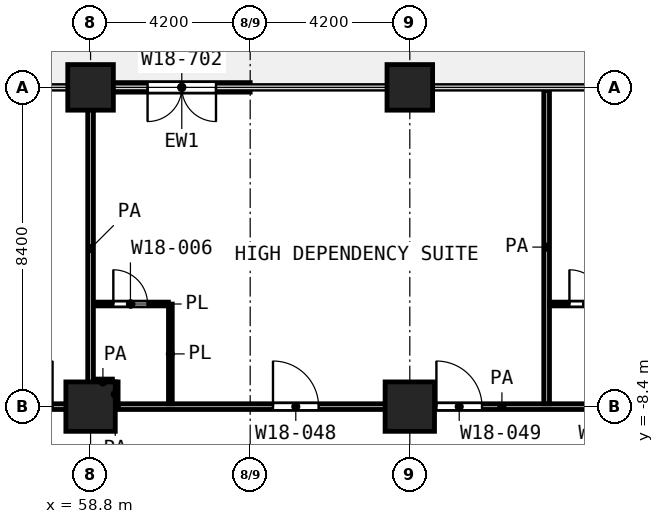
"""IFC4 building model, lengths in metres.
Left out: names, types, materials, properties, quantities, classifications, styles, units other than length and angle.
Written with IfcOpenShell. Run it as: python <this file> out.ifc"""

import sys

from ifc_helpers import new_model, si_unit, direction, frame, frame_2d, origin, origin_2d, place, context, subcontext, project, spatial, rectangle, extrude, element, fill, save


model = new_model("IFC4")
c1 = context("Model", 3, precision=1e-05, world=origin(), true_north=direction((0.0, 1.0)))
c2 = subcontext(c1, "Body", "Model", "MODEL_VIEW")
j1 = project(units=[si_unit("LENGTHUNIT", "METRE"), si_unit("PLANEANGLEUNIT", "RADIAN")], contexts=[c1])
p1 = place(None, origin())
s1 = spatial("IfcSite", under=j1, at=p1, CompositionType="ELEMENT")
p2 = place(p1, origin())
s2 = spatial("IfcBuilding", under=s1, at=p2, CompositionType="ELEMENT")
p3 = place(p2, frame((0.0, 0.0, 81.2)))
s3 = spatial("IfcBuildingStorey", under=s2, at=p3, CompositionType="ELEMENT", Elevation=81.2)
for number, where, z_axis, x_axis in (
    (1, (58.8, 0.0, 0.0), (0.0, 0.0, 1.0), (1.0, 0.0, 0.0)),
    (2, (67.2, 0.0, 0.0), (0.0, 0.0, 1.0), (1.0, 0.0, 0.0)),
):
    element("IfcColumn", number, at=place(p3, frame(where, z_axis=z_axis, x_axis=x_axis)), inside=s3, PredefinedType="COLUMN", context=c2, shape_type="SweptSolid", body=[
        extrude(rectangle(XDim=1.2, YDim=1.2, at=origin_2d()), origin(), (0.0, 0.0, 1.0), 4.2),
    ])
for number, where, z_axis, x_axis in (
    (3, (58.8, -8.4, 0.0), (0.0, 0.0, 1.0), (1.0, 0.0, 0.0)),
    (4, (67.2, -8.4, 0.0), (0.0, 0.0, 1.0), (1.0, 0.0, 0.0)),
):
    element("IfcColumn", number, at=place(p3, frame(where, z_axis=z_axis, x_axis=x_axis)), inside=s3, PredefinedType="COLUMN", context=c2, shape_type="SweptSolid", body=[
        extrude(rectangle(XDim=1.3, YDim=1.3, at=origin_2d()), origin(), (0.0, 0.0, 1.0), 4.2),
    ])
p4 = place(p3, frame((63.0, 0.0, 0.0), z_axis=(0.0, 0.0, 1.0), x_axis=(-1.0, 0.0, 0.0)))
e5 = element("IfcWall", 5, at=p4, inside=s3, PredefinedType="SOLIDWALL", context=c2, shape_type="SweptSolid", body=[
    extrude(rectangle(XDim=3.6, YDim=0.25, at=frame_2d((1.8, 0.0))), origin(), (0.0, 0.0, 1.0), 3.78),
])
p5 = place(p4, frame((0.9, 0.0, 0.0)))
e6 = element("IfcOpeningElement", 6, at=p5, cuts=e5, PredefinedType="OPENING", context=c2, shape_type="SweptSolid", body=[
    extrude(rectangle(XDim=1.8, YDim=2.1, at=frame_2d((0.9, 1.05))), frame((0.0, 0.135, 0.0), z_axis=(0.0, -1.0, 0.0), x_axis=(1.0, 0.0, 0.0)), (0.0, 0.0, 1.0), 0.27),
])
p6 = place(p3, frame((58.875, -5.7, 0.0), z_axis=(0.0, 0.0, 1.0), x_axis=(1.0, 0.0, 0.0)))
e7 = element("IfcWall", 7, at=p6, inside=s3, PredefinedType="PARTITIONING", context=c2, shape_type="SweptSolid", body=[
    extrude(rectangle(XDim=1.973, YDim=0.1, at=frame_2d((0.986, 0.0))), origin(), (0.0, 0.0, 1.0), 3.9),
])
p7 = place(p6, frame((0.524, 0.0, 0.0)))
e8 = element("IfcOpeningElement", 8, at=p7, cuts=e7, PredefinedType="OPENING", context=c2, shape_type="SweptSolid", body=[
    extrude(rectangle(XDim=0.9, YDim=2.1, at=frame_2d((0.45, 1.05))), frame((0.0, 0.06, 0.0), z_axis=(0.0, -1.0, 0.0), x_axis=(1.0, 0.0, 0.0)), (0.0, 0.0, 1.0), 0.12),
])
p8 = place(p3, frame((70.875, -5.7, 0.0), z_axis=(0.0, 0.0, 1.0), x_axis=(1.0, 0.0, 0.0)))
e9 = element("IfcWall", 9, at=p8, inside=s3, PredefinedType="PARTITIONING", context=c2, shape_type="SweptSolid", body=[
    extrude(rectangle(XDim=1.975, YDim=0.1, at=frame_2d((0.988, 0.0))), origin(), (0.0, 0.0, 1.0), 3.9),
])
p9 = place(p8, frame((0.525, 0.0, 0.0)))
e10 = element("IfcOpeningElement", 10, at=p9, cuts=e9, PredefinedType="OPENING", context=c2, shape_type="SweptSolid", body=[
    extrude(rectangle(XDim=0.9, YDim=2.1, at=frame_2d((0.45, 1.05))), frame((0.0, 0.06, 0.0), z_axis=(0.0, -1.0, 0.0), x_axis=(1.0, 0.0, 0.0)), (0.0, 0.0, 1.0), 0.12),
])
p10 = place(p3, frame((60.9, -8.325, 0.0), z_axis=(0.0, 0.0, 1.0), x_axis=(0.0, 1.0, 0.0)))
e11 = element("IfcWall", 11, at=p10, inside=s3, PredefinedType="PARTITIONING", context=c2, shape_type="SweptSolid", body=[
    extrude(rectangle(XDim=2.624, YDim=0.1, at=frame_2d((1.312, 0.0))), origin(), (0.0, 0.0, 1.0), 3.9),
])
p11 = place(p3, frame((51.0, -8.4, 0.0), z_axis=(0.0, 0.0, 1.0), x_axis=(1.0, 0.0, 0.0)))
e12 = element("IfcWall", 12, at=p11, inside=s3, PredefinedType="PARTITIONING", context=c2, shape_type="SweptSolid", body=[
    extrude(rectangle(XDim=7.723, YDim=0.15, at=frame_2d((3.861, 0.0))), origin(), (0.0, 0.0, 1.0), 3.9),
])
p12 = place(p11, frame((5.6, 0.0, 0.0)))
e13 = element("IfcOpeningElement", 13, at=p12, cuts=e12, PredefinedType="OPENING", context=c2, shape_type="SweptSolid", body=[
    extrude(rectangle(XDim=1.2, YDim=2.1, at=frame_2d((0.6, 1.05))), frame((0.0, 0.085, 0.0), z_axis=(0.0, -1.0, 0.0), x_axis=(1.0, 0.0, 0.0)), (0.0, 0.0, 1.0), 0.17),
])
p13 = place(p3, frame((59.527, -8.4, 0.0), z_axis=(0.0, 0.0, 1.0), x_axis=(1.0, 0.0, 0.0)))
e14 = element("IfcWall", 14, at=p13, inside=s3, PredefinedType="PARTITIONING", context=c2, shape_type="SweptSolid", body=[
    extrude(rectangle(XDim=20.193, YDim=0.15, at=frame_2d((10.096, 0.0))), origin(), (0.0, 0.0, 1.0), 3.9),
])
p14 = place(p13, frame((4.073, 0.0, 0.0)))
e15 = element("IfcOpeningElement", 15, at=p14, cuts=e14, PredefinedType="OPENING", context=c2, shape_type="SweptSolid", body=[
    extrude(rectangle(XDim=1.2, YDim=2.1, at=frame_2d((0.6, 1.05))), frame((0.0, 0.085, 0.0), z_axis=(0.0, -1.0, 0.0), x_axis=(1.0, 0.0, 0.0)), (0.0, 0.0, 1.0), 0.17),
])
p15 = place(p13, frame((8.373, 0.0, 0.0)))
e16 = element("IfcOpeningElement", 16, at=p15, cuts=e14, PredefinedType="OPENING", context=c2, shape_type="SweptSolid", body=[
    extrude(rectangle(XDim=1.2, YDim=2.1, at=frame_2d((0.6, 1.05))), frame((0.0, 0.085, 0.0), z_axis=(0.0, -1.0, 0.0), x_axis=(1.0, 0.0, 0.0)), (0.0, 0.0, 1.0), 0.17),
])
p16 = place(p13, frame((13.673, 0.0, 0.0)))
e17 = element("IfcOpeningElement", 17, at=p16, cuts=e14, PredefinedType="OPENING", context=c2, shape_type="SweptSolid", body=[
    extrude(rectangle(XDim=1.2, YDim=2.1, at=frame_2d((0.6, 1.05))), frame((0.0, 0.085, 0.0), z_axis=(0.0, -1.0, 0.0), x_axis=(1.0, 0.0, 0.0)), (0.0, 0.0, 1.0), 0.17),
])
p17 = place(p13, frame((17.673, 0.0, 0.0)))
e18 = element("IfcOpeningElement", 18, at=p17, cuts=e14, PredefinedType="OPENING", context=c2, shape_type="SweptSolid", body=[
    extrude(rectangle(XDim=1.0, YDim=2.1, at=frame_2d((0.5, 1.05))), frame((0.0, 0.085, 0.0), z_axis=(0.0, -1.0, 0.0), x_axis=(1.0, 0.0, 0.0)), (0.0, 0.0, 1.0), 0.17),
])
p18 = place(p3, frame((58.875, -7.75, 0.0), z_axis=(0.0, 0.0, 1.0), x_axis=(1.0, 0.0, 0.0)))
e19 = element("IfcWall", 19, at=p18, inside=s3, PredefinedType="PARTITIONING", context=c2, shape_type="SweptSolid", body=[
    extrude(rectangle(XDim=0.5, YDim=0.15, at=frame_2d((0.25, 0.0))), origin(), (0.0, 0.0, 1.0), 3.9),
])
p19 = place(p3, frame((58.8, -8.398, 0.0), z_axis=(0.0, 0.0, 1.0), x_axis=(0.0, 1.0, 0.0)))
e20 = element("IfcWall", 20, at=p19, inside=s3, PredefinedType="PARTITIONING", context=c2, shape_type="SweptSolid", body=[
    extrude(rectangle(XDim=8.318, YDim=0.15, at=frame_2d((4.159, 0.0))), origin(), (0.0, 0.0, 1.0), 3.9),
])
p20 = place(p3, frame((59.45, -8.398, 0.0), z_axis=(0.0, 0.0, 1.0), x_axis=(0.0, 1.0, 0.0)))
e21 = element("IfcWall", 21, at=p20, inside=s3, PredefinedType="PARTITIONING", context=c2, shape_type="SweptSolid", body=[
    extrude(rectangle(XDim=0.648, YDim=0.15, at=frame_2d((0.324, 0.0))), origin(), (0.0, 0.0, 1.0), 3.9),
])
p21 = place(p3, frame((70.8, -8.325, 0.0), z_axis=(0.0, 0.0, 1.0), x_axis=(0.0, 1.0, 0.0)))
e22 = element("IfcWall", 22, at=p21, inside=s3, PredefinedType="PARTITIONING", context=c2, shape_type="SweptSolid", body=[
    extrude(rectangle(XDim=8.245, YDim=0.15, at=frame_2d((4.123, 0.0))), origin(), (0.0, 0.0, 1.0), 3.9),
])
p22 = place(p5, origin())
e23 = element("IfcDoor", 23, at=p22, inside=s3, OperationType="DOUBLE_DOOR_SINGLE_SWING", PredefinedType="DOOR", context=c2, shape_type="SweptSolid", body=[
    extrude(rectangle(XDim=1.8, YDim=2.1, at=frame_2d((0.9, 1.05))), frame((0.0, 0.025, 0.0), z_axis=(0.0, -1.0, 0.0), x_axis=(1.0, 0.0, 0.0)), (0.0, 0.0, 1.0), 0.05),
])
fill(e6, e23)
p23 = place(p12, origin())
e24 = element("IfcDoor", 24, at=p23, inside=s3, OperationType="SINGLE_SWING_RIGHT", PredefinedType="DOOR", context=c2, shape_type="SweptSolid", body=[
    extrude(rectangle(XDim=1.2, YDim=2.1, at=frame_2d((0.6, 1.05))), frame((0.0, 0.025, 0.0), z_axis=(0.0, -1.0, 0.0), x_axis=(1.0, 0.0, 0.0)), (0.0, 0.0, 1.0), 0.05),
])
fill(e13, e24)
p24 = place(p14, origin())
e25 = element("IfcDoor", 25, at=p24, inside=s3, OperationType="SINGLE_SWING_LEFT", PredefinedType="DOOR", context=c2, shape_type="SweptSolid", body=[
    extrude(rectangle(XDim=1.2, YDim=2.1, at=frame_2d((0.6, 1.05))), frame((0.0, 0.025, 0.0), z_axis=(0.0, -1.0, 0.0), x_axis=(1.0, 0.0, 0.0)), (0.0, 0.0, 1.0), 0.05),
])
fill(e15, e25)
p25 = place(p15, origin())
e26 = element("IfcDoor", 26, at=p25, inside=s3, OperationType="SINGLE_SWING_LEFT", PredefinedType="DOOR", context=c2, shape_type="SweptSolid", body=[
    extrude(rectangle(XDim=1.2, YDim=2.1, at=frame_2d((0.6, 1.05))), frame((0.0, 0.025, 0.0), z_axis=(0.0, -1.0, 0.0), x_axis=(1.0, 0.0, 0.0)), (0.0, 0.0, 1.0), 0.05),
])
fill(e16, e26)
p26 = place(p7, origin())
e27 = element("IfcDoor", 27, at=p26, inside=s3, OperationType="SINGLE_SWING_LEFT", PredefinedType="DOOR", context=c2, shape_type="SweptSolid", body=[
    extrude(rectangle(XDim=0.9, YDim=2.1, at=frame_2d((0.45, 1.05))), frame((0.0, 0.025, 0.0), z_axis=(0.0, -1.0, 0.0), x_axis=(1.0, 0.0, 0.0)), (0.0, 0.0, 1.0), 0.05),
])
fill(e8, e27)
p27 = place(p9, origin())
e28 = element("IfcDoor", 28, at=p27, inside=s3, OperationType="SINGLE_SWING_LEFT", PredefinedType="DOOR", context=c2, shape_type="SweptSolid", body=[
    extrude(rectangle(XDim=0.9, YDim=2.1, at=frame_2d((0.45, 1.05))), frame((0.0, 0.025, 0.0), z_axis=(0.0, -1.0, 0.0), x_axis=(1.0, 0.0, 0.0)), (0.0, 0.0, 1.0), 0.05),
])
fill(e10, e28)
save(model, sys.argv[1])
